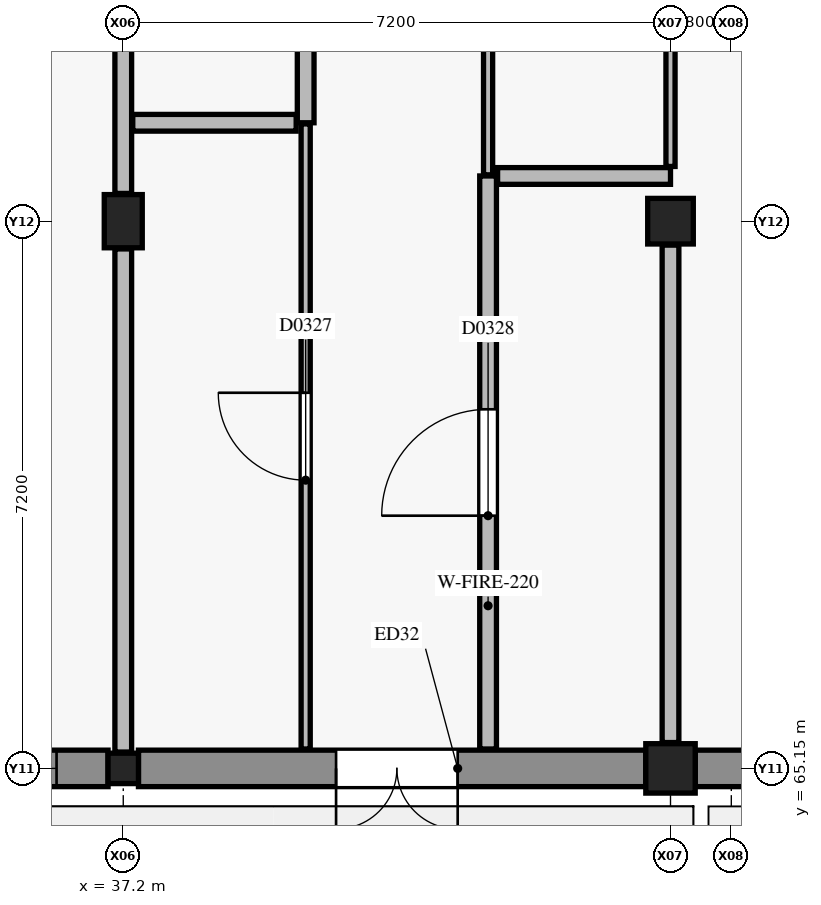
"""IFC4 building model, lengths in metres.
Left out: names, types, materials, properties, quantities, classifications, styles, units other than length and angle.
Written with IfcOpenShell. Run it as: python <this file> out.ifc"""

import sys

from ifc_helpers import new_model, si_unit, direction, frame, frame_2d, origin, origin_2d, place, context, subcontext, project, spatial, rectangle, extrude, element, fill, save


model = new_model("IFC4")
c1 = context("Model", 3, precision=1e-05, world=origin(), true_north=direction((0.0, 1.0)))
c2 = subcontext(c1, "Body", "Model", "MODEL_VIEW")
j1 = project(units=[si_unit("LENGTHUNIT", "METRE"), si_unit("PLANEANGLEUNIT", "RADIAN")], contexts=[c1])
p1 = place(None, origin())
s1 = spatial("IfcSite", under=j1, at=p1, CompositionType="ELEMENT")
p2 = place(p1, origin())
s2 = spatial("IfcBuilding", under=s1, at=p2, CompositionType="ELEMENT")
p3 = place(p2, origin())
s3 = spatial("IfcBuildingStorey", under=s2, at=p3, CompositionType="ELEMENT", Elevation=0.0)
p4 = place(p3, frame((37.2, 65.15, 0.0), z_axis=(0.0, 0.0, 1.0), x_axis=(1.0, 0.0, 0.0)))
e1 = element("IfcColumn", 1, at=p4, inside=s3, PredefinedType="COLUMN", context=c2, shape_type="SweptSolid", body=[
    extrude(rectangle(XDim=0.4, YDim=0.4, at=origin_2d()), origin(), (0.0, 0.0, 1.0), 4.8),
])
p5 = place(p3, frame((37.2, 72.35, 0.0), z_axis=(0.0, 0.0, 1.0), x_axis=(1.0, 0.0, 0.0)))
e2 = element("IfcColumn", 2, at=p5, inside=s3, PredefinedType="COLUMN", context=c2, shape_type="SweptSolid", body=[
    extrude(rectangle(XDim=0.5, YDim=0.7, at=origin_2d()), origin(), (0.0, 0.0, 1.0), 4.8),
])
p6 = place(p3, frame((44.4, 65.15, 0.0), z_axis=(0.0, 0.0, 1.0), x_axis=(1.0, 0.0, 0.0)))
e3 = element("IfcColumn", 3, at=p6, inside=s3, PredefinedType="COLUMN", context=c2, shape_type="SweptSolid", body=[
    extrude(rectangle(XDim=0.65, YDim=0.65, at=origin_2d()), origin(), (0.0, 0.0, 1.0), 4.8),
])
p7 = place(p3, frame((44.4, 72.35, 0.0), z_axis=(0.0, 0.0, 1.0), x_axis=(1.0, 0.0, 0.0)))
e4 = element("IfcColumn", 4, at=p7, inside=s3, PredefinedType="COLUMN", context=c2, shape_type="SweptSolid", body=[
    extrude(rectangle(XDim=0.6, YDim=0.6, at=origin_2d()), origin(), (0.0, 0.0, 1.0), 4.8),
])
p8 = place(p3, frame((51.3, 65.15, 0.0), z_axis=(0.0, 0.0, 1.0), x_axis=(-1.0, 0.0, 0.0)))
e5 = element("IfcWall", 5, at=p8, inside=s3, PredefinedType="SOLIDWALL", context=c2, shape_type="SweptSolid", body=[
    extrude(rectangle(XDim=6.575, YDim=0.48, at=frame_2d((3.288, 0.0))), origin(), (0.0, 0.0, 1.0), 3.7),
])
p9 = place(p8, frame((1.015, 0.0, 0.6)))
e6 = element("IfcOpeningElement", 6, at=p9, cuts=e5, PredefinedType="OPENING", context=c2, shape_type="SweptSolid", body=[
    extrude(rectangle(XDim=1.6, YDim=2.2, at=frame_2d((0.8, 1.1))), frame((0.0, 0.25, 0.0), z_axis=(0.0, -1.0, 0.0), x_axis=(1.0, 0.0, 0.0)), (0.0, 0.0, 1.0), 0.5),
])
p10 = place(p8, frame((4.673, 0.0, 0.9)))
e7 = element("IfcOpeningElement", 7, at=p10, cuts=e5, PredefinedType="OPENING", context=c2, shape_type="SweptSolid", body=[
    extrude(rectangle(XDim=0.9, YDim=1.2, at=frame_2d((0.45, 0.6))), frame((0.0, 0.25, 0.0), z_axis=(0.0, -1.0, 0.0), x_axis=(1.0, 0.0, 0.0)), (0.0, 0.0, 1.0), 0.5),
])
p11 = place(p3, frame((44.075, 65.15, 0.0), z_axis=(0.0, 0.0, 1.0), x_axis=(-1.0, 0.0, 0.0)))
e8 = element("IfcWall", 8, at=p11, inside=s3, PredefinedType="SOLIDWALL", context=c2, shape_type="SweptSolid", body=[
    extrude(rectangle(XDim=6.675, YDim=0.48, at=frame_2d((3.337, 0.0))), origin(), (0.0, 0.0, 1.0), 3.7),
])
p12 = place(p11, frame((2.475, 0.0, 0.0)))
e9 = element("IfcOpeningElement", 9, at=p12, cuts=e8, PredefinedType="OPENING", context=c2, shape_type="SweptSolid", body=[
    extrude(rectangle(XDim=1.6, YDim=2.3, at=frame_2d((0.8, 1.15))), frame((0.0, 0.25, 0.0), z_axis=(0.0, -1.0, 0.0), x_axis=(1.0, 0.0, 0.0)), (0.0, 0.0, 1.0), 0.5),
])
p13 = place(p3, frame((37.0, 65.15, 0.0), z_axis=(0.0, 0.0, 1.0), x_axis=(-1.0, 0.0, 0.0)))
e10 = element("IfcWall", 10, at=p13, inside=s3, PredefinedType="SOLIDWALL", context=c2, shape_type="SweptSolid", body=[
    extrude(rectangle(XDim=6.65, YDim=0.48, at=frame_2d((3.325, 0.0))), origin(), (0.0, 0.0, 1.0), 3.7),
])
p14 = place(p13, frame((0.677, 0.0, 0.95)))
e11 = element("IfcOpeningElement", 11, at=p14, cuts=e10, PredefinedType="OPENING", context=c2, shape_type="SweptSolid", body=[
    extrude(rectangle(XDim=0.9, YDim=1.2, at=frame_2d((0.45, 0.6))), frame((0.0, 0.25, 0.0), z_axis=(0.0, -1.0, 0.0), x_axis=(1.0, 0.0, 0.0)), (0.0, 0.0, 1.0), 0.5),
])
p15 = place(p13, frame((3.0, 0.0, 0.6)))
e12 = element("IfcOpeningElement", 12, at=p15, cuts=e10, PredefinedType="OPENING", context=c2, shape_type="SweptSolid", body=[
    extrude(rectangle(XDim=0.8, YDim=2.6, at=frame_2d((0.4, 1.3))), frame((0.0, 0.25, 0.0), z_axis=(0.0, -1.0, 0.0), x_axis=(1.0, 0.0, 0.0)), (0.0, 0.0, 1.0), 0.5),
])
p16 = place(p3, frame((42.0, 65.405, 0.0), z_axis=(0.0, 0.0, 1.0), x_axis=(0.0, 1.0, 0.0)))
e13 = element("IfcWall", 13, at=p16, inside=s3, PredefinedType="PARTITIONING", context=c2, shape_type="SweptSolid", body=[
    extrude(rectangle(XDim=7.54, YDim=0.22, at=frame_2d((3.77, 0.0))), origin(), (0.0, 0.0, 1.0), 3.785),
])
p17 = place(p16, frame((3.07, 0.0, 0.0)))
e14 = element("IfcOpeningElement", 14, at=p17, cuts=e13, PredefinedType="OPENING", context=c2, shape_type="SweptSolid", body=[
    extrude(rectangle(XDim=1.4, YDim=2.2, at=frame_2d((0.7, 1.1))), frame((0.0, 0.12, 0.0), z_axis=(0.0, -1.0, 0.0), x_axis=(1.0, 0.0, 0.0)), (0.0, 0.0, 1.0), 0.24),
])
p18 = place(p3, frame((39.6, 73.645, 0.0), z_axis=(0.0, 0.0, 1.0), x_axis=(0.0, 1.0, 0.0)))
e15 = element("IfcWall", 15, at=p18, inside=s3, PredefinedType="PARTITIONING", context=c2, shape_type="SweptSolid", body=[
    extrude(rectangle(XDim=7.63, YDim=0.22, at=frame_2d((3.815, 0.0))), origin(), (0.0, 0.0, 1.0), 3.925),
])
p19 = place(p18, frame((3.115, 0.0, 0.0)))
e16 = element("IfcOpeningElement", 16, at=p19, cuts=e15, PredefinedType="OPENING", context=c2, shape_type="SweptSolid", body=[
    extrude(rectangle(XDim=1.4, YDim=2.2, at=frame_2d((0.7, 1.1))), frame((0.0, 0.12, 0.0), z_axis=(0.0, -1.0, 0.0), x_axis=(1.0, 0.0, 0.0)), (0.0, 0.0, 1.0), 0.24),
])
p20 = place(p3, frame((39.6, 65.405, 0.0), z_axis=(0.0, 0.0, 1.0), x_axis=(0.0, 1.0, 0.0)))
e17 = element("IfcWall", 17, at=p20, inside=s3, PredefinedType="PARTITIONING", context=c2, shape_type="SweptSolid", body=[
    extrude(rectangle(XDim=8.225, YDim=0.12, at=frame_2d((4.112, 0.0))), origin(), (0.0, 0.0, 1.0), 3.785),
])
p21 = place(p20, frame((3.538, 0.0, 0.0)))
e18 = element("IfcOpeningElement", 18, at=p21, cuts=e17, PredefinedType="OPENING", context=c2, shape_type="SweptSolid", body=[
    extrude(rectangle(XDim=1.15, YDim=2.15, at=frame_2d((0.575, 1.075))), frame((0.0, 0.07, 0.0), z_axis=(0.0, -1.0, 0.0), x_axis=(1.0, 0.0, 0.0)), (0.0, 0.0, 1.0), 0.14),
])
p22 = place(p3, frame((42.0, 72.96, 0.0), z_axis=(0.0, 0.0, 1.0), x_axis=(0.0, 1.0, 0.0)))
e19 = element("IfcWall", 19, at=p22, inside=s3, PredefinedType="PARTITIONING", context=c2, shape_type="SweptSolid", body=[
    extrude(rectangle(XDim=8.44, YDim=0.12, at=frame_2d((4.22, 0.0))), origin(), (0.0, 0.0, 1.0), 3.925),
])
p23 = place(p22, frame((3.42, 0.0, 0.0)))
e20 = element("IfcOpeningElement", 20, at=p23, cuts=e19, PredefinedType="OPENING", context=c2, shape_type="SweptSolid", body=[
    extrude(rectangle(XDim=1.6, YDim=2.25, at=frame_2d((0.8, 1.125))), frame((0.0, 0.07, 0.0), z_axis=(0.0, -1.0, 0.0), x_axis=(1.0, 0.0, 0.0)), (0.0, 0.0, 1.0), 0.14),
])
p24 = place(p3, frame((37.2, 65.365, 0.0), z_axis=(0.0, 0.0, 1.0), x_axis=(0.0, 1.0, 0.0)))
e21 = element("IfcWall", 21, at=p24, inside=s3, PredefinedType="PARTITIONING", context=c2, shape_type="SweptSolid", body=[
    extrude(rectangle(XDim=6.62, YDim=0.22, at=frame_2d((3.31, 0.0))), origin(), (0.0, 0.0, 1.0), 3.925),
])
p25 = place(p3, frame((37.2, 72.715, 0.0), z_axis=(0.0, 0.0, 1.0), x_axis=(0.0, 1.0, 0.0)))
e22 = element("IfcWall", 22, at=p25, inside=s3, PredefinedType="PARTITIONING", context=c2, shape_type="SweptSolid", body=[
    extrude(rectangle(XDim=6.495, YDim=0.22, at=frame_2d((3.248, 0.0))), origin(), (0.0, 0.0, 1.0), 3.925),
])
p26 = place(p3, frame((37.325, 73.645, 0.0), z_axis=(0.0, 0.0, 1.0), x_axis=(1.0, 0.0, 0.0)))
e23 = element("IfcWall", 23, at=p26, inside=s3, PredefinedType="PARTITIONING", context=c2, shape_type="SweptSolid", body=[
    extrude(rectangle(XDim=2.15, YDim=0.22, at=frame_2d((1.075, 0.0))), origin(), (0.0, 0.0, 1.0), 4.52),
])
p27 = place(p3, frame((44.4, 65.49, 0.0), z_axis=(0.0, 0.0, 1.0), x_axis=(0.0, 1.0, 0.0)))
e24 = element("IfcWall", 24, at=p27, inside=s3, PredefinedType="PARTITIONING", context=c2, shape_type="SweptSolid", body=[
    extrude(rectangle(XDim=6.545, YDim=0.22, at=frame_2d((3.272, 0.0))), origin(), (0.0, 0.0, 1.0), 3.705),
])
p28 = place(p3, frame((42.125, 72.945, 0.0), z_axis=(0.0, 0.0, 1.0), x_axis=(1.0, 0.0, 0.0)))
e25 = element("IfcWall", 25, at=p28, inside=s3, PredefinedType="PARTITIONING", context=c2, shape_type="SweptSolid", body=[
    extrude(rectangle(XDim=2.275, YDim=0.22, at=frame_2d((1.137, 0.0))), origin(), (0.0, 0.0, 1.0), 3.805),
])
p29 = place(p3, frame((44.4, 73.07, 0.0), z_axis=(0.0, 0.0, 1.0), x_axis=(0.0, 1.0, 0.0)))
e26 = element("IfcWall", 26, at=p29, inside=s3, PredefinedType="PARTITIONING", context=c2, shape_type="SweptSolid", body=[
    extrude(rectangle(XDim=6.19, YDim=0.12, at=frame_2d((3.095, 0.0))), origin(), (0.0, 0.0, 1.0), 3.805),
])
p30 = place(p12, origin())
e27 = element("IfcDoor", 27, at=p30, inside=s3, OperationType="DOUBLE_DOOR_SINGLE_SWING", PredefinedType="DOOR", context=c2, shape_type="SweptSolid", body=[
    extrude(rectangle(XDim=1.6, YDim=2.3, at=frame_2d((0.8, 1.15))), frame((0.0, 0.025, 0.0), z_axis=(0.0, -1.0, 0.0), x_axis=(1.0, 0.0, 0.0)), (0.0, 0.0, 1.0), 0.05),
])
fill(e9, e27)
p31 = place(p14, origin())
e28 = element("IfcWindow", 28, at=p31, inside=s3, PartitioningType="SINGLE_PANEL", PredefinedType="WINDOW", context=c2, shape_type="SweptSolid", body=[
    extrude(rectangle(XDim=0.9, YDim=1.2, at=frame_2d((0.45, 0.6))), frame((0.0, 0.03, 0.0), z_axis=(0.0, -1.0, 0.0), x_axis=(1.0, 0.0, 0.0)), (0.0, 0.0, 1.0), 0.06),
])
fill(e11, e28)
p32 = place(p21, origin())
e29 = element("IfcDoor", 29, at=p32, inside=s3, OperationType="SINGLE_SWING_RIGHT", PredefinedType="DOOR", context=c2, shape_type="SweptSolid", body=[
    extrude(rectangle(XDim=1.15, YDim=2.15, at=frame_2d((0.575, 1.075))), frame((0.0, 0.025, 0.0), z_axis=(0.0, -1.0, 0.0), x_axis=(1.0, 0.0, 0.0)), (0.0, 0.0, 1.0), 0.05),
])
fill(e18, e29)
p33 = place(p17, origin())
e30 = element("IfcDoor", 30, at=p33, inside=s3, OperationType="SINGLE_SWING_LEFT", PredefinedType="DOOR", context=c2, shape_type="SweptSolid", body=[
    extrude(rectangle(XDim=1.4, YDim=2.2, at=frame_2d((0.7, 1.1))), frame((0.0, 0.025, 0.0), z_axis=(0.0, -1.0, 0.0), x_axis=(1.0, 0.0, 0.0)), (0.0, 0.0, 1.0), 0.05),
])
fill(e14, e30)
save(model, sys.argv[1])
